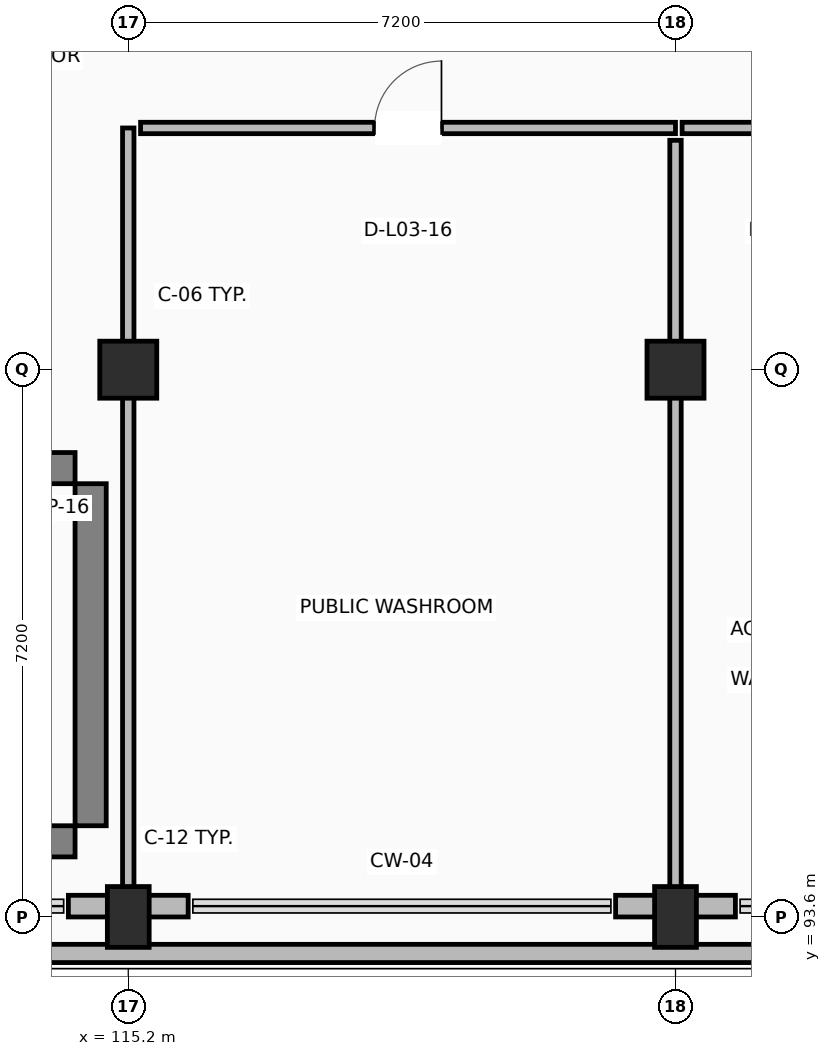
"""IFC4 building model, lengths in metres.
Left out: names, types, materials, properties, quantities, classifications, styles, units other than length and angle.
Written with IfcOpenShell. Run it as: python <this file> out.ifc"""

import sys

from ifc_helpers import new_model, si_unit, direction, frame, frame_2d, origin, origin_2d, place, context, subcontext, project, spatial, rectangle, extrude, element, fill, save


model = new_model("IFC4")
c1 = context("Model", 3, precision=1e-05, world=origin(), true_north=direction((0.0, 1.0)))
c2 = subcontext(c1, "Body", "Model", "MODEL_VIEW")
j1 = project(units=[si_unit("LENGTHUNIT", "METRE"), si_unit("PLANEANGLEUNIT", "RADIAN")], contexts=[c1])
p1 = place(None, origin())
s1 = spatial("IfcSite", under=j1, at=p1, CompositionType="ELEMENT")
p2 = place(p1, origin())
s2 = spatial("IfcBuilding", under=s1, at=p2, CompositionType="ELEMENT")
p3 = place(p2, frame((0.0, 0.0, 13.5)))
s3 = spatial("IfcBuildingStorey", under=s2, at=p3, CompositionType="ELEMENT", Elevation=13.5)
p4 = place(p3, frame((115.2, 93.6, 0.0), z_axis=(0.0, 0.0, 1.0), x_axis=(1.0, 0.0, 0.0)))
e1 = element("IfcColumn", 1, at=p4, inside=s3, PredefinedType="COLUMN", context=c2, shape_type="SweptSolid", body=[
    extrude(rectangle(XDim=0.55, YDim=0.8, at=origin_2d()), origin(), (0.0, 0.0, 1.0), 4.22),
])
p5 = place(p3, frame((115.2, 100.8, 0.0), z_axis=(0.0, 0.0, 1.0), x_axis=(1.0, 0.0, 0.0)))
e2 = element("IfcColumn", 2, at=p5, inside=s3, PredefinedType="COLUMN", context=c2, shape_type="SweptSolid", body=[
    extrude(rectangle(XDim=0.75, YDim=0.75, at=origin_2d()), origin(), (0.0, 0.0, 1.0), 4.22),
])
p6 = place(p3, frame((122.4, 93.6, 0.0), z_axis=(0.0, 0.0, 1.0), x_axis=(1.0, 0.0, 0.0)))
e3 = element("IfcColumn", 3, at=p6, inside=s3, PredefinedType="COLUMN", context=c2, shape_type="SweptSolid", body=[
    extrude(rectangle(XDim=0.55, YDim=0.8, at=origin_2d()), origin(), (0.0, 0.0, 1.0), 4.22),
])
p7 = place(p3, frame((122.4, 100.8, 0.0), z_axis=(0.0, 0.0, 1.0), x_axis=(1.0, 0.0, 0.0)))
e4 = element("IfcColumn", 4, at=p7, inside=s3, PredefinedType="COLUMN", context=c2, shape_type="SweptSolid", body=[
    extrude(rectangle(XDim=0.75, YDim=0.75, at=origin_2d()), origin(), (0.0, 0.0, 1.0), 4.22),
])
for number, where, z_axis, x_axis in (
    (5, (105.0, 94.595, 0.0), (0.0, 0.0, 1.0), (1.0, 0.0, 0.0)),
    (6, (105.0, 99.505, 0.0), (0.0, 0.0, 1.0), (1.0, 0.0, 0.0)),
):
    element("IfcWall", number, at=place(p3, frame(where, z_axis=z_axis, x_axis=x_axis)), inside=s3, PredefinedType="SHEAR", context=c2, shape_type="SweptSolid", body=[
        extrude(rectangle(XDim=9.5, YDim=0.41, at=frame_2d((4.75, 0.0))), origin(), (0.0, 0.0, 1.0), 4.22),
    ])
p8 = place(p3, frame((114.705, 94.8, 0.0), z_axis=(0.0, 0.0, 1.0), x_axis=(0.0, 1.0, 0.0)))
e7 = element("IfcWall", 7, at=p8, inside=s3, PredefinedType="SHEAR", context=c2, shape_type="SweptSolid", body=[
    extrude(rectangle(XDim=4.5, YDim=0.41, at=frame_2d((2.25, 0.0))), origin(), (0.0, 0.0, 1.0), 4.22),
])
for number, where, z_axis, x_axis in (
    (8, (114.412, 93.742, 0.0), (0.0, 0.0, 1.0), (1.0, 0.0, 0.0)),
    (9, (121.612, 93.742, 0.0), (0.0, 0.0, 1.0), (1.0, 0.0, 0.0)),
):
    element("IfcWall", number, at=place(p3, frame(where, z_axis=z_axis, x_axis=x_axis)), inside=s3, PredefinedType="STANDARD", context=c2, shape_type="SweptSolid", body=[
        extrude(rectangle(XDim=1.576, YDim=0.285, at=frame_2d((0.788, 0.0))), origin(), (0.0, 0.0, 1.0), 3.26),
    ])
p9 = place(p3, frame((136.44, 93.12, 0.0), z_axis=(0.0, 0.0, 1.0), x_axis=(-1.0, 0.0, 0.0)))
e10 = element("IfcWall", 10, at=p9, inside=s3, PredefinedType="PARAPET", context=c2, shape_type="SweptSolid", body=[
    extrude(rectangle(XDim=57.84, YDim=0.24, at=frame_2d((28.92, 0.0))), origin(), (0.0, 0.0, 1.0), 1.12),
])
p10 = place(p3, frame((115.2, 93.972, 0.0), z_axis=(0.0, 0.0, 1.0), x_axis=(0.0, 1.0, 0.0)))
e11 = element("IfcWall", 11, at=p10, inside=s3, PredefinedType="PARTITIONING", context=c2, shape_type="SweptSolid", body=[
    extrude(rectangle(XDim=10.008, YDim=0.15, at=frame_2d((5.004, 0.0))), origin(), (0.0, 0.0, 1.0), 3.26),
])
p11 = place(p3, frame((115.362, 103.98, 0.0), z_axis=(0.0, 0.0, 1.0), x_axis=(1.0, 0.0, 0.0)))
e12 = element("IfcWall", 12, at=p11, inside=s3, PredefinedType="PARTITIONING", context=c2, shape_type="SweptSolid", body=[
    extrude(rectangle(XDim=7.038, YDim=0.15, at=frame_2d((3.519, 0.0))), origin(), (0.0, 0.0, 1.0), 3.26),
])
p12 = place(p11, frame((3.079, 0.0, 0.0)))
e13 = element("IfcOpeningElement", 13, at=p12, cuts=e12, PredefinedType="OPENING", context=c2, shape_type="SweptSolid", body=[
    extrude(rectangle(XDim=0.88, YDim=2.1, at=frame_2d((0.44, 1.05))), frame((0.0, 0.085, 0.0), z_axis=(0.0, -1.0, 0.0), x_axis=(1.0, 0.0, 0.0)), (0.0, 0.0, 1.0), 0.17),
])
p13 = place(p3, frame((122.4, 103.818, 0.0), z_axis=(0.0, 0.0, 1.0), x_axis=(0.0, -1.0, 0.0)))
e14 = element("IfcWall", 14, at=p13, inside=s3, PredefinedType="PARTITIONING", context=c2, shape_type="SweptSolid", body=[
    extrude(rectangle(XDim=9.846, YDim=0.15, at=frame_2d((4.923, 0.0))), origin(), (0.0, 0.0, 1.0), 3.26),
])
p14 = place(p3, frame((122.487, 103.98, 0.0), z_axis=(0.0, 0.0, 1.0), x_axis=(1.0, 0.0, 0.0)))
e15 = element("IfcWall", 15, at=p14, inside=s3, PredefinedType="PARTITIONING", context=c2, shape_type="SweptSolid", body=[
    extrude(rectangle(XDim=2.913, YDim=0.15, at=frame_2d((1.457, 0.0))), origin(), (0.0, 0.0, 1.0), 3.26),
])
p15 = place(p14, frame((1.007, 0.0, 0.0)))
e16 = element("IfcOpeningElement", 16, at=p15, cuts=e15, PredefinedType="OPENING", context=c2, shape_type="SweptSolid", body=[
    extrude(rectangle(XDim=0.9, YDim=2.1, at=frame_2d((0.45, 1.05))), frame((0.0, 0.085, 0.0), z_axis=(0.0, -1.0, 0.0), x_axis=(1.0, 0.0, 0.0)), (0.0, 0.0, 1.0), 0.17),
])
p16 = place(p12, origin())
e17 = element("IfcDoor", 17, at=p16, inside=s3, OperationType="SINGLE_SWING_RIGHT", PredefinedType="DOOR", context=c2, shape_type="SweptSolid", body=[
    extrude(rectangle(XDim=0.88, YDim=2.1, at=frame_2d((0.44, 1.05))), frame((0.0, 0.025, 0.0), z_axis=(0.0, -1.0, 0.0), x_axis=(1.0, 0.0, 0.0)), (0.0, 0.0, 1.0), 0.05),
])
fill(e13, e17)
save(model, sys.argv[1])
